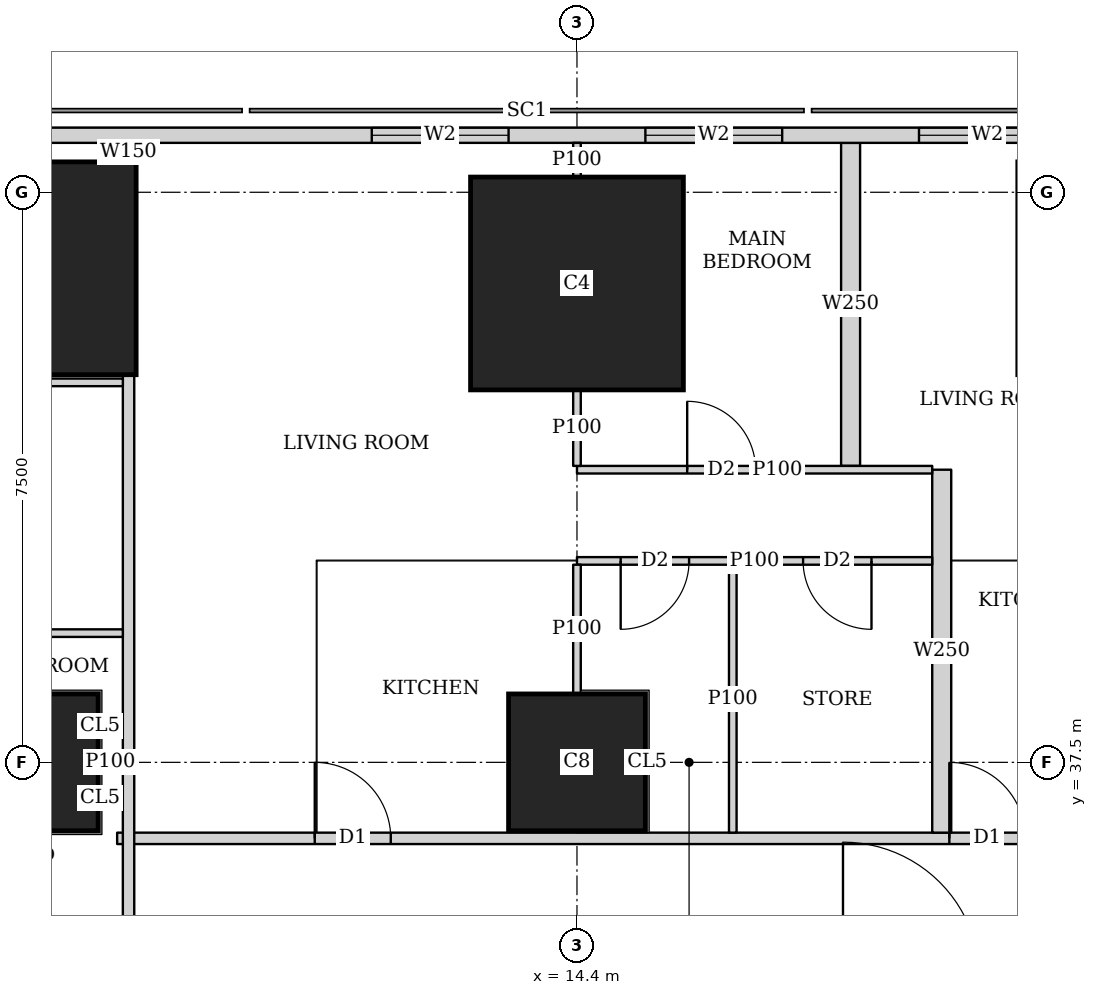
"""IFC4 building model, lengths in metres.
Left out: names, types, materials, properties, quantities, classifications, styles, units other than length and angle.
Written with IfcOpenShell. Run it as: python <this file> out.ifc"""

import sys

from ifc_helpers import new_model, si_unit, direction, frame, frame_2d, origin, origin_2d, place, context, subcontext, project, spatial, rectangle, extrude, element, fill, save


model = new_model("IFC4")
c1 = context("Model", 3, precision=1e-05, world=origin(), true_north=direction((0.0, 1.0)))
c2 = subcontext(c1, "Body", "Model", "MODEL_VIEW")
j1 = project(units=[si_unit("LENGTHUNIT", "METRE"), si_unit("PLANEANGLEUNIT", "RADIAN")], contexts=[c1])
p1 = place(None, origin())
s1 = spatial("IfcSite", under=j1, at=p1, CompositionType="ELEMENT")
p2 = place(p1, origin())
s2 = spatial("IfcBuilding", under=s1, at=p2, CompositionType="ELEMENT")
p3 = place(p2, frame((0.0, 0.0, 68.75)))
s3 = spatial("IfcBuildingStorey", under=s2, at=p3, CompositionType="ELEMENT", Elevation=68.75)
for number, where, z_axis, x_axis in (
    (1, (7.2, 37.5, 0.0), (0.0, 0.0, 1.0), (1.0, 0.0, 0.0)),
    (2, (14.4, 37.5, 0.0), (0.0, 0.0, 1.0), (1.0, 0.0, 0.0)),
):
    element("IfcColumn", number, at=place(p3, frame(where, z_axis=z_axis, x_axis=x_axis)), inside=s3, PredefinedType="COLUMN", context=c2, shape_type="SweptSolid", body=[
        extrude(rectangle(XDim=1.8, YDim=1.8, at=origin_2d()), origin(), (0.0, 0.0, 1.0), 3.75),
    ])
for number, where, z_axis, x_axis in (
    (3, (7.2, 44.0, 0.0), (0.0, 0.0, 1.0), (1.0, 0.0, 0.0)),
    (4, (14.4, 43.8, 0.0), (0.0, 0.0, 1.0), (1.0, 0.0, 0.0)),
):
    element("IfcColumn", number, at=place(p3, frame(where, z_axis=z_axis, x_axis=x_axis)), inside=s3, PredefinedType="COLUMN", context=c2, shape_type="SweptSolid", body=[
        extrude(rectangle(XDim=2.8, YDim=2.8, at=origin_2d()), origin(), (0.0, 0.0, 1.0), 3.75),
    ])
p4 = place(p3, frame((40.106, 45.75, 0.0), z_axis=(0.0, 0.0, 1.0), x_axis=(-1.0, 0.0, 0.0)))
e5 = element("IfcWall", 5, at=p4, inside=s3, PredefinedType="SOLIDWALL", context=c2, shape_type="SweptSolid", body=[
    extrude(rectangle(XDim=37.943, YDim=0.2, at=frame_2d((18.971, 0.0))), origin(), (0.0, 0.0, 1.0), 3.45),
])
p5 = place(p4, frame((8.606, 0.0, 0.9)))
e6 = element("IfcOpeningElement", 6, at=p5, cuts=e5, PredefinedType="OPENING", context=c2, shape_type="SweptSolid", body=[
    extrude(rectangle(XDim=1.8, YDim=1.5, at=frame_2d((0.9, 0.75))), frame((0.0, 0.11, 0.0), z_axis=(0.0, -1.0, 0.0), x_axis=(1.0, 0.0, 0.0)), (0.0, 0.0, 1.0), 0.22),
])
p6 = place(p4, frame((12.206, 0.0, 0.9)))
e7 = element("IfcOpeningElement", 7, at=p6, cuts=e5, PredefinedType="OPENING", context=c2, shape_type="SweptSolid", body=[
    extrude(rectangle(XDim=1.8, YDim=1.5, at=frame_2d((0.9, 0.75))), frame((0.0, 0.11, 0.0), z_axis=(0.0, -1.0, 0.0), x_axis=(1.0, 0.0, 0.0)), (0.0, 0.0, 1.0), 0.22),
])
p7 = place(p4, frame((15.806, 0.0, 0.9)))
e8 = element("IfcOpeningElement", 8, at=p7, cuts=e5, PredefinedType="OPENING", context=c2, shape_type="SweptSolid", body=[
    extrude(rectangle(XDim=1.8, YDim=1.5, at=frame_2d((0.9, 0.75))), frame((0.0, 0.11, 0.0), z_axis=(0.0, -1.0, 0.0), x_axis=(1.0, 0.0, 0.0)), (0.0, 0.0, 1.0), 0.22),
])
p8 = place(p4, frame((19.406, 0.0, 0.9)))
e9 = element("IfcOpeningElement", 9, at=p8, cuts=e5, PredefinedType="OPENING", context=c2, shape_type="SweptSolid", body=[
    extrude(rectangle(XDim=1.8, YDim=1.5, at=frame_2d((0.9, 0.75))), frame((0.0, 0.11, 0.0), z_axis=(0.0, -1.0, 0.0), x_axis=(1.0, 0.0, 0.0)), (0.0, 0.0, 1.0), 0.22),
])
p9 = place(p4, frame((23.006, 0.0, 0.9)))
e10 = element("IfcOpeningElement", 10, at=p9, cuts=e5, PredefinedType="OPENING", context=c2, shape_type="SweptSolid", body=[
    extrude(rectangle(XDim=1.8, YDim=1.5, at=frame_2d((0.9, 0.75))), frame((0.0, 0.11, 0.0), z_axis=(0.0, -1.0, 0.0), x_axis=(1.0, 0.0, 0.0)), (0.0, 0.0, 1.0), 0.22),
])
p10 = place(p4, frame((26.606, 0.0, 0.9)))
e11 = element("IfcOpeningElement", 11, at=p10, cuts=e5, PredefinedType="OPENING", context=c2, shape_type="SweptSolid", body=[
    extrude(rectangle(XDim=1.8, YDim=1.5, at=frame_2d((0.9, 0.75))), frame((0.0, 0.11, 0.0), z_axis=(0.0, -1.0, 0.0), x_axis=(1.0, 0.0, 0.0)), (0.0, 0.0, 1.0), 0.22),
])
p11 = place(p3, frame((8.5, 2.426, 0.0), z_axis=(0.0, 0.0, 1.0), x_axis=(0.0, 1.0, 0.0)))
e12 = element("IfcWall", 12, at=p11, inside=s3, PredefinedType="SOLIDWALL", context=c2, shape_type="SweptSolid", body=[
    extrude(rectangle(XDim=40.173, YDim=0.15, at=frame_2d((20.086, 0.0))), origin(), (0.0, 0.0, 1.0), 3.45),
])
p12 = place(p11, frame((6.661, 0.0, 0.0)))
e13 = element("IfcOpeningElement", 13, at=p12, cuts=e12, PredefinedType="OPENING", context=c2, shape_type="SweptSolid", body=[
    extrude(rectangle(XDim=1.0, YDim=2.1, at=frame_2d((0.5, 1.05))), frame((0.0, 0.085, 0.0), z_axis=(0.0, -1.0, 0.0), x_axis=(1.0, 0.0, 0.0)), (0.0, 0.0, 1.0), 0.17),
])
p13 = place(p11, frame((9.986, 0.0, 0.0)))
e14 = element("IfcOpeningElement", 14, at=p13, cuts=e12, PredefinedType="OPENING", context=c2, shape_type="SweptSolid", body=[
    extrude(rectangle(XDim=1.0, YDim=2.1, at=frame_2d((0.5, 1.05))), frame((0.0, 0.085, 0.0), z_axis=(0.0, -1.0, 0.0), x_axis=(1.0, 0.0, 0.0)), (0.0, 0.0, 1.0), 0.17),
])
p14 = place(p11, frame((17.487, 0.0, 0.0)))
e15 = element("IfcOpeningElement", 15, at=p14, cuts=e12, PredefinedType="OPENING", context=c2, shape_type="SweptSolid", body=[
    extrude(rectangle(XDim=1.0, YDim=2.1, at=frame_2d((0.5, 1.05))), frame((0.0, 0.085, 0.0), z_axis=(0.0, -1.0, 0.0), x_axis=(1.0, 0.0, 0.0)), (0.0, 0.0, 1.0), 0.17),
])
p15 = place(p11, frame((24.987, 0.0, 0.0)))
e16 = element("IfcOpeningElement", 16, at=p15, cuts=e12, PredefinedType="OPENING", context=c2, shape_type="SweptSolid", body=[
    extrude(rectangle(XDim=1.0, YDim=2.1, at=frame_2d((0.5, 1.05))), frame((0.0, 0.085, 0.0), z_axis=(0.0, -1.0, 0.0), x_axis=(1.0, 0.0, 0.0)), (0.0, 0.0, 1.0), 0.17),
])
p16 = place(p3, frame((8.5, 45.401, 0.0), z_axis=(0.0, 0.0, 1.0), x_axis=(0.0, 1.0, 0.0)))
e17 = element("IfcWall", 17, at=p16, inside=s3, PredefinedType="SOLIDWALL", context=c2, shape_type="SweptSolid", body=[
    extrude(rectangle(XDim=0.249, YDim=0.15, at=frame_2d((0.125, 0.0))), origin(), (0.0, 0.0, 1.0), 3.45),
])
p17 = place(p3, frame((8.35, 36.5, 0.0), z_axis=(0.0, 0.0, 1.0), x_axis=(1.0, 0.0, 0.0)))
e18 = element("IfcWall", 18, at=p17, inside=s3, PredefinedType="SOLIDWALL", context=c2, shape_type="SweptSolid", body=[
    extrude(rectangle(XDim=26.415, YDim=0.15, at=frame_2d((13.208, 0.0))), origin(), (0.0, 0.0, 1.0), 3.45),
])
p18 = place(p17, frame((2.6, 0.0, 0.0)))
e19 = element("IfcOpeningElement", 19, at=p18, cuts=e18, PredefinedType="OPENING", context=c2, shape_type="SweptSolid", body=[
    extrude(rectangle(XDim=1.0, YDim=2.1, at=frame_2d((0.5, 1.05))), frame((0.0, 0.085, 0.0), z_axis=(0.0, -1.0, 0.0), x_axis=(1.0, 0.0, 0.0)), (0.0, 0.0, 1.0), 0.17),
])
p19 = place(p17, frame((10.949, 0.0, 0.0)))
e20 = element("IfcOpeningElement", 20, at=p19, cuts=e18, PredefinedType="OPENING", context=c2, shape_type="SweptSolid", body=[
    extrude(rectangle(XDim=1.0, YDim=2.1, at=frame_2d((0.5, 1.05))), frame((0.0, 0.085, 0.0), z_axis=(0.0, -1.0, 0.0), x_axis=(1.0, 0.0, 0.0)), (0.0, 0.0, 1.0), 0.17),
])
p20 = place(p17, frame((18.149, 0.0, 0.0)))
e21 = element("IfcOpeningElement", 21, at=p20, cuts=e18, PredefinedType="OPENING", context=c2, shape_type="SweptSolid", body=[
    extrude(rectangle(XDim=1.0, YDim=2.1, at=frame_2d((0.5, 1.05))), frame((0.0, 0.085, 0.0), z_axis=(0.0, -1.0, 0.0), x_axis=(1.0, 0.0, 0.0)), (0.0, 0.0, 1.0), 0.17),
])
p21 = place(p3, frame((8.101, 37.5, 0.0), z_axis=(0.0, 0.0, 1.0), x_axis=(1.0, 0.0, 0.0)))
e22 = element("IfcWall", 22, at=p21, inside=s3, PredefinedType="PARTITIONING", context=c2, shape_type="SweptSolid", body=[
    extrude(rectangle(XDim=0.324, YDim=0.1, at=frame_2d((0.162, 0.0))), origin(), (0.0, 0.0, 1.0), 3.45),
])
p22 = place(p3, frame((4.9, 42.499, 0.0), z_axis=(0.0, 0.0, 1.0), x_axis=(1.0, 0.0, 0.0)))
e23 = element("IfcWall", 23, at=p22, inside=s3, PredefinedType="PARTITIONING", context=c2, shape_type="SweptSolid", body=[
    extrude(rectangle(XDim=3.525, YDim=0.1, at=frame_2d((1.763, 0.0))), origin(), (0.0, 0.0, 1.0), 2.0),
])
p23 = place(p3, frame((4.9, 39.2, 0.0), z_axis=(0.0, 0.0, 1.0), x_axis=(1.0, 0.0, 0.0)))
e24 = element("IfcWall", 24, at=p23, inside=s3, PredefinedType="PARTITIONING", context=c2, shape_type="SweptSolid", body=[
    extrude(rectangle(XDim=3.525, YDim=0.1, at=frame_2d((1.763, 0.0))), origin(), (0.0, 0.0, 1.0), 3.45),
])
p24 = place(p3, frame((14.4, 41.35, 0.0), z_axis=(0.0, 0.0, 1.0), x_axis=(1.0, 0.0, 0.0)))
e25 = element("IfcWall", 25, at=p24, inside=s3, PredefinedType="PARTITIONING", context=c2, shape_type="SweptSolid", body=[
    extrude(rectangle(XDim=4.674, YDim=0.1, at=frame_2d((2.337, 0.0))), origin(), (0.0, 0.0, 1.0), 3.45),
])
p25 = place(p24, frame((1.45, 0.0, 0.0)))
e26 = element("IfcOpeningElement", 26, at=p25, cuts=e25, PredefinedType="OPENING", context=c2, shape_type="SweptSolid", body=[
    extrude(rectangle(XDim=0.9, YDim=2.1, at=frame_2d((0.45, 1.05))), frame((0.0, 0.06, 0.0), z_axis=(0.0, -1.0, 0.0), x_axis=(1.0, 0.0, 0.0)), (0.0, 0.0, 1.0), 0.12),
])
p26 = place(p3, frame((14.4, 40.15, 0.0), z_axis=(0.0, 0.0, 1.0), x_axis=(1.0, 0.0, 0.0)))
e27 = element("IfcWall", 27, at=p26, inside=s3, PredefinedType="PARTITIONING", context=c2, shape_type="SweptSolid", body=[
    extrude(rectangle(XDim=4.674, YDim=0.1, at=frame_2d((2.337, 0.0))), origin(), (0.0, 0.0, 1.0), 3.45),
])
p27 = place(p26, frame((0.575, 0.0, 0.0)))
e28 = element("IfcOpeningElement", 28, at=p27, cuts=e27, PredefinedType="OPENING", context=c2, shape_type="SweptSolid", body=[
    extrude(rectangle(XDim=0.9, YDim=2.1, at=frame_2d((0.45, 1.05))), frame((0.0, 0.06, 0.0), z_axis=(0.0, -1.0, 0.0), x_axis=(1.0, 0.0, 0.0)), (0.0, 0.0, 1.0), 0.12),
])
p28 = place(p26, frame((2.975, 0.0, 0.0)))
e29 = element("IfcOpeningElement", 29, at=p28, cuts=e27, PredefinedType="OPENING", context=c2, shape_type="SweptSolid", body=[
    extrude(rectangle(XDim=0.9, YDim=2.1, at=frame_2d((0.45, 1.05))), frame((0.0, 0.06, 0.0), z_axis=(0.0, -1.0, 0.0), x_axis=(1.0, 0.0, 0.0)), (0.0, 0.0, 1.0), 0.12),
])
p29 = place(p3, frame((14.4, 41.4, 0.0), z_axis=(0.0, 0.0, 1.0), x_axis=(0.0, 1.0, 0.0)))
e30 = element("IfcWall", 30, at=p29, inside=s3, PredefinedType="PARTITIONING", context=c2, shape_type="SweptSolid", body=[
    extrude(rectangle(XDim=0.999, YDim=0.1, at=frame_2d((0.5, 0.0))), origin(), (0.0, 0.0, 1.0), 3.45),
])
p30 = place(p3, frame((14.4, 45.201, 0.0), z_axis=(0.0, 0.0, 1.0), x_axis=(0.0, 1.0, 0.0)))
e31 = element("IfcWall", 31, at=p30, inside=s3, PredefinedType="PARTITIONING", context=c2, shape_type="SweptSolid", body=[
    extrude(rectangle(XDim=0.449, YDim=0.1, at=frame_2d((0.225, 0.0))), origin(), (0.0, 0.0, 1.0), 3.45),
])
p31 = place(p3, frame((14.4, 38.401, 0.0), z_axis=(0.0, 0.0, 1.0), x_axis=(0.0, 1.0, 0.0)))
e32 = element("IfcWall", 32, at=p31, inside=s3, PredefinedType="PARTITIONING", context=c2, shape_type="SweptSolid", body=[
    extrude(rectangle(XDim=1.699, YDim=0.1, at=frame_2d((0.85, 0.0))), origin(), (0.0, 0.0, 1.0), 3.45),
])
p32 = place(p3, frame((16.45, 36.575, 0.0), z_axis=(0.0, 0.0, 1.0), x_axis=(0.0, 1.0, 0.0)))
e33 = element("IfcWall", 33, at=p32, inside=s3, PredefinedType="PARTITIONING", context=c2, shape_type="SweptSolid", body=[
    extrude(rectangle(XDim=3.525, YDim=0.1, at=frame_2d((1.763, 0.0))), origin(), (0.0, 0.0, 1.0), 3.45),
])
p33 = place(p3, frame((18.0, 41.4, 0.0), z_axis=(0.0, 0.0, 1.0), x_axis=(0.0, 1.0, 0.0)))
e34 = element("IfcWall", 34, at=p33, inside=s3, PredefinedType="SOLIDWALL", context=c2, shape_type="SweptSolid", body=[
    extrude(rectangle(XDim=4.25, YDim=0.25, at=frame_2d((2.125, 0.0))), origin(), (0.0, 0.0, 1.0), 2.0),
])
p34 = place(p3, frame((19.199, 36.575, 0.0), z_axis=(0.0, 0.0, 1.0), x_axis=(0.0, 1.0, 0.0)))
e35 = element("IfcWall", 35, at=p34, inside=s3, PredefinedType="SOLIDWALL", context=c2, shape_type="SweptSolid", body=[
    extrude(rectangle(XDim=4.775, YDim=0.25, at=frame_2d((2.388, 0.0))), origin(), (0.0, 0.0, 1.0), 3.45),
])
p35 = place(p8, origin())
e36 = element("IfcWindow", 36, at=p35, inside=s3, PartitioningType="SINGLE_PANEL", PredefinedType="WINDOW", context=c2, shape_type="SweptSolid", body=[
    extrude(rectangle(XDim=1.8, YDim=1.5, at=frame_2d((0.9, 0.75))), frame((0.0, 0.03, 0.0), z_axis=(0.0, -1.0, 0.0), x_axis=(1.0, 0.0, 0.0)), (0.0, 0.0, 1.0), 0.06),
])
fill(e9, e36)
p36 = place(p9, origin())
e37 = element("IfcWindow", 37, at=p36, inside=s3, PartitioningType="SINGLE_PANEL", PredefinedType="WINDOW", context=c2, shape_type="SweptSolid", body=[
    extrude(rectangle(XDim=1.8, YDim=1.5, at=frame_2d((0.9, 0.75))), frame((0.0, 0.03, 0.0), z_axis=(0.0, -1.0, 0.0), x_axis=(1.0, 0.0, 0.0)), (0.0, 0.0, 1.0), 0.06),
])
fill(e10, e37)
p37 = place(p10, origin())
e38 = element("IfcWindow", 38, at=p37, inside=s3, PartitioningType="SINGLE_PANEL", PredefinedType="WINDOW", context=c2, shape_type="SweptSolid", body=[
    extrude(rectangle(XDim=1.8, YDim=1.5, at=frame_2d((0.9, 0.75))), frame((0.0, 0.03, 0.0), z_axis=(0.0, -1.0, 0.0), x_axis=(1.0, 0.0, 0.0)), (0.0, 0.0, 1.0), 0.06),
])
fill(e11, e38)
p38 = place(p25, origin())
e39 = element("IfcDoor", 39, at=p38, inside=s3, OperationType="SINGLE_SWING_LEFT", PredefinedType="DOOR", context=c2, shape_type="SweptSolid", body=[
    extrude(rectangle(XDim=0.9, YDim=2.1, at=frame_2d((0.45, 1.05))), frame((0.0, 0.025, 0.0), z_axis=(0.0, -1.0, 0.0), x_axis=(1.0, 0.0, 0.0)), (0.0, 0.0, 1.0), 0.05),
])
fill(e26, e39)
p39 = place(p27, origin())
e40 = element("IfcDoor", 40, at=p39, inside=s3, OperationType="SINGLE_SWING_RIGHT", PredefinedType="DOOR", context=c2, shape_type="SweptSolid", body=[
    extrude(rectangle(XDim=0.9, YDim=2.1, at=frame_2d((0.45, 1.05))), frame((0.0, 0.025, 0.0), z_axis=(0.0, -1.0, 0.0), x_axis=(1.0, 0.0, 0.0)), (0.0, 0.0, 1.0), 0.05),
])
fill(e28, e40)
p40 = place(p28, origin())
e41 = element("IfcDoor", 41, at=p40, inside=s3, OperationType="SINGLE_SWING_LEFT", PredefinedType="DOOR", context=c2, shape_type="SweptSolid", body=[
    extrude(rectangle(XDim=0.9, YDim=2.1, at=frame_2d((0.45, 1.05))), frame((0.0, 0.025, 0.0), z_axis=(0.0, -1.0, 0.0), x_axis=(1.0, 0.0, 0.0)), (0.0, 0.0, 1.0), 0.05),
])
fill(e29, e41)
p41 = place(p18, origin())
e42 = element("IfcDoor", 42, at=p41, inside=s3, OperationType="SINGLE_SWING_LEFT", PredefinedType="DOOR", context=c2, shape_type="SweptSolid", body=[
    extrude(rectangle(XDim=1.0, YDim=2.1, at=frame_2d((0.5, 1.05))), frame((0.0, 0.025, 0.0), z_axis=(0.0, -1.0, 0.0), x_axis=(1.0, 0.0, 0.0)), (0.0, 0.0, 1.0), 0.05),
])
fill(e19, e42)
p42 = place(p19, origin())
e43 = element("IfcDoor", 43, at=p42, inside=s3, OperationType="SINGLE_SWING_LEFT", PredefinedType="DOOR", context=c2, shape_type="SweptSolid", body=[
    extrude(rectangle(XDim=1.0, YDim=2.1, at=frame_2d((0.5, 1.05))), frame((0.0, 0.025, 0.0), z_axis=(0.0, -1.0, 0.0), x_axis=(1.0, 0.0, 0.0)), (0.0, 0.0, 1.0), 0.05),
])
fill(e20, e43)
save(model, sys.argv[1])
